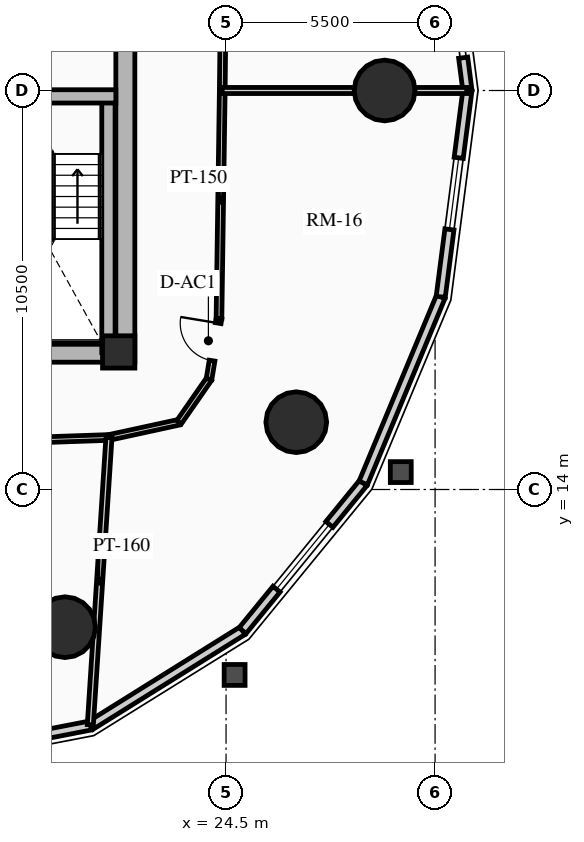
"""IFC4 building model, lengths in metres.
Left out: names, types, materials, properties, quantities, classifications, styles, units other than length and angle.
Written with IfcOpenShell. Run it as: python <this file> out.ifc"""

import sys

from ifc_helpers import new_model, si_unit, direction, frame, frame_2d, origin, origin_2d, place, context, subcontext, project, spatial, rectangle, circle, extrude, source, transform, mapped, element, fill, save


model = new_model("IFC4")
c1 = context("Model", 3, precision=1e-05, world=origin(), true_north=direction((0.0, 1.0)))
c2 = subcontext(c1, "Body", "Model", "MODEL_VIEW")
j1 = project(units=[si_unit("LENGTHUNIT", "METRE"), si_unit("PLANEANGLEUNIT", "RADIAN")], contexts=[c1])
p1 = place(None, origin())
s1 = spatial("IfcSite", under=j1, at=p1, CompositionType="ELEMENT")
p2 = place(p1, origin())
s2 = spatial("IfcBuilding", under=s1, at=p2, CompositionType="ELEMENT")
p3 = place(p2, frame((0.0, 0.0, 27.82)))
s3 = spatial("IfcBuildingStorey", under=s2, at=p3, CompositionType="ELEMENT", Elevation=27.82)
p4 = place(p3, frame((21.85, 17.35, 0.0), z_axis=(0.0, 0.0, 1.0), x_axis=(0.0, 1.0, 0.0)))
e1 = element("IfcWall", 1, at=p4, inside=s3, PredefinedType="SHEAR", context=c2, shape_type="SweptSolid", body=[
    extrude(rectangle(XDim=14.3, YDim=0.5, at=frame_2d((7.15, 0.0))), origin(), (0.0, 0.0, 1.0), 2.91),
])
p5 = place(p3, frame((11.15, 17.6, 0.0), z_axis=(0.0, 0.0, 1.0), x_axis=(1.0, 0.0, 0.0)))
e2 = element("IfcWall", 2, at=p5, inside=s3, PredefinedType="SHEAR", context=c2, shape_type="SweptSolid", body=[
    extrude(rectangle(XDim=10.7, YDim=0.5, at=frame_2d((5.35, 0.0))), origin(), (0.0, 0.0, 1.0), 2.91),
])
m1 = source(origin(), c2, "Body", "SweptSolid", [
    extrude(rectangle(XDim=1.5, YDim=2.02, at=frame_2d((0.75, 1.01))), frame((0.0, 0.26, 0.0), z_axis=(0.0, -1.0, 0.0), x_axis=(1.0, 0.0, 0.0)), (0.0, 0.0, 1.0), 0.52),
])
p6 = place(p5, frame((5.45, 0.0, 0.0)))
e3 = element("IfcOpeningElement", 3, at=p6, cuts=e2, PredefinedType="OPENING", context=c2, shape_type="MappedRepresentation", body=[
    mapped(m1, transform((0.0, 0.0, 0.0), x_axis=(1.0, 0.0, 0.0), y_axis=(0.0, 1.0, 0.0), z_axis=(0.0, 0.0, 1.0), scale=1.0)),
])
p7 = place(p3, frame((21.405, 17.6, 0.0), z_axis=(0.0, 0.0, 1.0), x_axis=(0.0, 1.0, 0.0)))
e4 = element("IfcWall", 4, at=p7, inside=s3, PredefinedType="SHEAR", context=c2, shape_type="SweptSolid", body=[
    extrude(rectangle(XDim=6.745, YDim=0.35, at=frame_2d((3.373, 0.0))), origin(), (0.0, 0.0, 1.0), 2.91),
])
p8 = place(p3, frame((18.315, 24.345, 0.0), z_axis=(0.0, 0.0, 1.0), x_axis=(1.0, 0.0, 0.0)))
e5 = element("IfcWall", 5, at=p8, inside=s3, PredefinedType="SHEAR", context=c2, shape_type="SweptSolid", body=[
    extrude(rectangle(XDim=3.285, YDim=0.35, at=frame_2d((1.643, 0.0))), origin(), (0.0, 0.0, 1.0), 2.91),
])
p9 = place(p3, frame((21.675, 17.62, 0.0), z_axis=(0.0, 0.0, 1.0), x_axis=(1.0, 0.0, 0.0)))
e6 = element("IfcColumn", 6, at=p9, inside=s3, PredefinedType="COLUMN", context=c2, shape_type="SweptSolid", body=[
    extrude(rectangle(XDim=0.85, YDim=0.85, at=origin_2d()), origin(), (0.0, 0.0, 1.0), 2.91),
])
for number, where, z_axis, x_axis in (
    (7, (28.672, 24.5, 0.0), (0.0, 0.0, 1.0), (1.0, 0.0, 0.0)),
    (8, (20.261, 10.377, 0.0), (0.0, 0.0, 1.0), (1.0, 0.0, 0.0)),
    (9, (26.347, 15.771, 0.0), (0.0, 0.0, 1.0), (1.0, 0.0, 0.0)),
):
    element("IfcColumn", number, at=place(p3, frame(where, z_axis=z_axis, x_axis=x_axis)), inside=s3, PredefinedType="USERDEFINED", context=c2, shape_type="SweptSolid", body=[
        extrude(circle(Radius=0.8, at=origin_2d()), origin(), (0.0, 0.0, 1.0), 2.91),
    ])
p10 = place(p3, frame((30.739, 25.363, 0.0), z_axis=(0.0, 0.0, 1.0), x_axis=(0.128523364007, -0.991706481225, 0.0)))
e10 = element("IfcWall", 10, at=p10, inside=s3, PredefinedType="SOLIDWALL", context=c2, shape_type="SweptSolid", body=[
    extrude(rectangle(XDim=0.87, YDim=0.24, at=frame_2d((0.435, 0.0))), origin(), (0.0, 0.0, 1.0), 2.073),
])
p11 = place(p3, frame((20.935, 7.79, 0.0), z_axis=(0.0, 0.0, 1.0), x_axis=(-0.981717351035, -0.190344536766, 0.0)))
e11 = element("IfcWall", 11, at=p11, inside=s3, PredefinedType="SOLIDWALL", context=c2, shape_type="SweptSolid", body=[
    extrude(rectangle(XDim=4.517, YDim=0.24, at=frame_2d((2.259, 0.0))), origin(), (0.0, 0.0, 1.0), 2.635),
])
m2 = source(origin(), c2, "Body", "SweptSolid", [
    extrude(rectangle(XDim=1.9, YDim=1.35, at=frame_2d((0.95, 0.675))), frame((0.0, 0.13, 0.0), z_axis=(0.0, -1.0, 0.0), x_axis=(1.0, 0.0, 0.0)), (0.0, 0.0, 1.0), 0.26),
])
p12 = place(p11, frame((1.309, 0.0, 0.65)))
e12 = element("IfcOpeningElement", 12, at=p12, cuts=e11, PredefinedType="OPENING", context=c2, shape_type="MappedRepresentation", body=[
    mapped(m2, transform((0.0, 0.0, 0.0), x_axis=(1.0, 0.0, 0.0), y_axis=(0.0, 1.0, 0.0), z_axis=(0.0, 0.0, 1.0), scale=1.0)),
])
p13 = place(p3, frame((24.935, 10.286, 0.0), z_axis=(0.0, 0.0, 1.0), x_axis=(-0.848422721916, -0.529319265601, 0.0)))
e13 = element("IfcWall", 13, at=p13, inside=s3, PredefinedType="SOLIDWALL", context=c2, shape_type="SweptSolid", body=[
    extrude(rectangle(XDim=4.715, YDim=0.24, at=frame_2d((2.357, 0.0))), origin(), (0.0, 0.0, 1.0), 2.635),
])
p14 = place(p3, frame((28.11, 14.173, 0.0), z_axis=(0.0, 0.0, 1.0), x_axis=(-0.632588557044, -0.774488035735, 0.0)))
e14 = element("IfcWall", 14, at=p14, inside=s3, PredefinedType="SOLIDWALL", context=c2, shape_type="SweptSolid", body=[
    extrude(rectangle(XDim=5.019, YDim=0.24, at=frame_2d((2.509, 0.0))), origin(), (0.0, 0.0, 1.0), 2.635),
])
m3 = source(origin(), c2, "Body", "SweptSolid", [
    extrude(rectangle(XDim=2.2, YDim=1.35, at=frame_2d((1.1, 0.675))), frame((0.0, 0.13, 0.0), z_axis=(0.0, -1.0, 0.0), x_axis=(1.0, 0.0, 0.0)), (0.0, 0.0, 1.0), 0.26),
])
p15 = place(p14, frame((1.409, 0.0, 0.65)))
e15 = element("IfcOpeningElement", 15, at=p15, cuts=e14, PredefinedType="OPENING", context=c2, shape_type="MappedRepresentation", body=[
    mapped(m3, transform((0.0, 0.0, 0.0), x_axis=(1.0, 0.0, 0.0), y_axis=(0.0, 1.0, 0.0), z_axis=(0.0, 0.0, 1.0), scale=1.0)),
])
p16 = place(p3, frame((30.149, 19.071, 0.0), z_axis=(0.0, 0.0, 1.0), x_axis=(-0.384255919668, -0.923226618009, 0.0)))
e16 = element("IfcWall", 16, at=p16, inside=s3, PredefinedType="SOLIDWALL", context=c2, shape_type="SweptSolid", body=[
    extrude(rectangle(XDim=5.305, YDim=0.24, at=frame_2d((2.653, 0.0))), origin(), (0.0, 0.0, 1.0), 2.635),
])
p17 = place(p3, frame((30.851, 24.5, 0.0), z_axis=(0.0, 0.0, 1.0), x_axis=(-0.128298189174, -0.991735637483, 0.0)))
e17 = element("IfcWall", 17, at=p17, inside=s3, PredefinedType="SOLIDWALL", context=c2, shape_type="SweptSolid", body=[
    extrude(rectangle(XDim=5.475, YDim=0.24, at=frame_2d((2.737, 0.0))), origin(), (0.0, 0.0, 1.0), 2.073),
])
p18 = place(p17, frame((1.787, 0.0, 0.65)))
e18 = element("IfcOpeningElement", 18, at=p18, cuts=e17, PredefinedType="OPENING", context=c2, shape_type="MappedRepresentation", body=[
    mapped(m2, transform((0.0, 0.0, 0.0), x_axis=(1.0, 0.0, 0.0), y_axis=(0.0, 1.0, 0.0), z_axis=(0.0, 0.0, 1.0), scale=1.0)),
])
p19 = place(p3, frame((24.4, 24.5, 0.0), z_axis=(0.0, 0.0, 1.0), x_axis=(0.011299841544, 0.999936154752, 0.0)))
e19 = element("IfcWall", 19, at=p19, inside=s3, PredefinedType="PARTITIONING", context=c2, shape_type="SweptSolid", body=[
    extrude(rectangle(XDim=6.115, YDim=0.15, at=frame_2d((3.057, 0.0))), origin(), (0.0, 0.0, 1.0), 2.159),
])
m4 = source(origin(), c2, "Body", "SweptSolid", [
    extrude(rectangle(XDim=1.05, YDim=2.015, at=frame_2d((0.525, 1.007))), frame((0.0, 0.085, 0.0), z_axis=(0.0, -1.0, 0.0), x_axis=(1.0, 0.0, 0.0)), (0.0, 0.0, 1.0), 0.17),
])
p20 = place(p19, frame((2.532, 0.0, 0.0)))
e20 = element("IfcOpeningElement", 20, at=p20, cuts=e19, PredefinedType="OPENING", context=c2, shape_type="MappedRepresentation", body=[
    mapped(m4, transform((0.0, 0.0, 0.0), x_axis=(1.0, 0.0, 0.0), y_axis=(0.0, 1.0, 0.0), z_axis=(0.0, 0.0, 1.0), scale=1.0)),
])
p21 = place(p3, frame((14.781, 15.141, 0.0), z_axis=(0.0, 0.0, 1.0), x_axis=(0.999407918707, 0.034406569513, 0.0)))
e21 = element("IfcWall", 21, at=p21, inside=s3, PredefinedType="PARTITIONING", context=c2, shape_type="SweptSolid", body=[
    extrude(rectangle(XDim=6.642, YDim=0.15, at=frame_2d((3.321, 0.0))), origin(), (0.0, 0.0, 1.0), 2.159),
])
p22 = place(p3, frame((21.419, 15.369, 0.0), z_axis=(0.0, 0.0, 1.0), x_axis=(0.977192701953, 0.212354475464, 0.0)))
e22 = element("IfcWall", 22, at=p22, inside=s3, PredefinedType="PARTITIONING", context=c2, shape_type="SweptSolid", body=[
    extrude(rectangle(XDim=1.888, YDim=0.15, at=frame_2d((0.944, 0.0))), origin(), (0.0, 0.0, 1.0), 2.205),
])
p23 = place(p3, frame((23.263, 15.77, 0.0), z_axis=(0.0, 0.0, 1.0), x_axis=(0.570743456919, 0.821128434768, 0.0)))
e23 = element("IfcWall", 23, at=p23, inside=s3, PredefinedType="PARTITIONING", context=c2, shape_type="SweptSolid", body=[
    extrude(rectangle(XDim=1.382, YDim=0.15, at=frame_2d((0.691, 0.0))), origin(), (0.0, 0.0, 1.0), 2.159),
])
p24 = place(p3, frame((24.052, 16.905, 0.0), z_axis=(0.0, 0.0, 1.0), x_axis=(0.162091534225, 0.986775726562, 0.0)))
e24 = element("IfcWall", 24, at=p24, inside=s3, PredefinedType="PARTITIONING", context=c2, shape_type="SweptSolid", body=[
    extrude(rectangle(XDim=1.613, YDim=0.15, at=frame_2d((0.807, 0.0))), origin(), (0.0, 0.0, 1.0), 2.205),
])
m5 = source(origin(), c2, "Body", "SweptSolid", [
    extrude(rectangle(XDim=1.0, YDim=2.015, at=frame_2d((0.5, 1.007))), frame((0.0, 0.085, 0.0), z_axis=(0.0, -1.0, 0.0), x_axis=(1.0, 0.0, 0.0)), (0.0, 0.0, 1.0), 0.17),
])
p25 = place(p24, frame((0.493, 0.0, 0.0)))
e25 = element("IfcOpeningElement", 25, at=p25, cuts=e24, PredefinedType="OPENING", context=c2, shape_type="MappedRepresentation", body=[
    mapped(m5, transform((0.0, 0.0, 0.0), x_axis=(1.0, 0.0, 0.0), y_axis=(0.0, 1.0, 0.0), z_axis=(0.0, 0.0, 1.0), scale=1.0)),
])
p26 = place(p3, frame((24.313, 18.496, 0.0), z_axis=(0.0, 0.0, 1.0), x_axis=(0.014394019188, 0.999896400739, 0.0)))
e26 = element("IfcWall", 26, at=p26, inside=s3, PredefinedType="PARTITIONING", context=c2, shape_type="SweptSolid", body=[
    extrude(rectangle(XDim=6.004, YDim=0.15, at=frame_2d((3.002, 0.0))), origin(), (0.0, 0.0, 1.0), 2.635),
])
p27 = place(p3, frame((24.4, 24.5, 0.0), z_axis=(0.0, 0.0, 1.0), x_axis=(1.0, 0.0, 0.0)))
e27 = element("IfcWall", 27, at=p27, inside=s3, PredefinedType="PARTITIONING", context=c2, shape_type="SweptSolid", body=[
    extrude(rectangle(XDim=6.431, YDim=0.16, at=frame_2d((3.216, 0.0))), origin(), (0.0, 0.0, 1.0), 2.073),
])
p28 = place(p3, frame((21.419, 15.369, 0.0), z_axis=(0.0, 0.0, 1.0), x_axis=(-0.064709408161, -0.997904149954, 0.0)))
e28 = element("IfcWall", 28, at=p28, inside=s3, PredefinedType="PARTITIONING", context=c2, shape_type="SweptSolid", body=[
    extrude(rectangle(XDim=7.576, YDim=0.16, at=frame_2d((3.788, 0.0))), origin(), (0.0, 0.0, 1.0), 2.073),
])
m6 = source(origin(), c2, "Body", "SweptSolid", [
    extrude(rectangle(XDim=2.2, YDim=1.35, at=frame_2d((1.1, 0.675))), frame((0.0, 0.03, 0.0), z_axis=(0.0, -1.0, 0.0), x_axis=(1.0, 0.0, 0.0)), (0.0, 0.0, 1.0), 0.06),
])
p29 = place(p15, origin())
e29 = element("IfcWindow", 29, at=p29, inside=s3, PartitioningType="DOUBLE_PANEL_VERTICAL", PredefinedType="WINDOW", context=c2, shape_type="MappedRepresentation", body=[
    mapped(m6, transform((0.0, 0.0, 0.0), x_axis=(1.0, 0.0, 0.0), y_axis=(0.0, 1.0, 0.0), z_axis=(0.0, 0.0, 1.0), scale=1.0)),
])
fill(e15, e29)
m7 = source(origin(), c2, "Body", "SweptSolid", [
    extrude(rectangle(XDim=1.9, YDim=1.35, at=frame_2d((0.95, 0.675))), frame((0.0, 0.03, 0.0), z_axis=(0.0, -1.0, 0.0), x_axis=(1.0, 0.0, 0.0)), (0.0, 0.0, 1.0), 0.06),
])
p30 = place(p18, origin())
e30 = element("IfcWindow", 30, at=p30, inside=s3, PartitioningType="DOUBLE_PANEL_VERTICAL", PredefinedType="WINDOW", context=c2, shape_type="MappedRepresentation", body=[
    mapped(m7, transform((0.0, 0.0, 0.0), x_axis=(1.0, 0.0, 0.0), y_axis=(0.0, 1.0, 0.0), z_axis=(0.0, 0.0, 1.0), scale=1.0)),
])
fill(e18, e30)
m8 = source(origin(), c2, "Body", "SweptSolid", [
    extrude(rectangle(XDim=1.0, YDim=2.015, at=frame_2d((0.5, 1.007))), frame((0.0, 0.025, 0.0), z_axis=(0.0, -1.0, 0.0), x_axis=(1.0, 0.0, 0.0)), (0.0, 0.0, 1.0), 0.05),
])
p31 = place(p25, origin())
e31 = element("IfcDoor", 31, at=p31, inside=s3, OperationType="SINGLE_SWING_RIGHT", PredefinedType="DOOR", context=c2, shape_type="MappedRepresentation", body=[
    mapped(m8, transform((0.0, 0.0, 0.0), x_axis=(1.0, 0.0, 0.0), y_axis=(0.0, 1.0, 0.0), z_axis=(0.0, 0.0, 1.0), scale=1.0)),
])
fill(e25, e31)
save(model, sys.argv[1])
